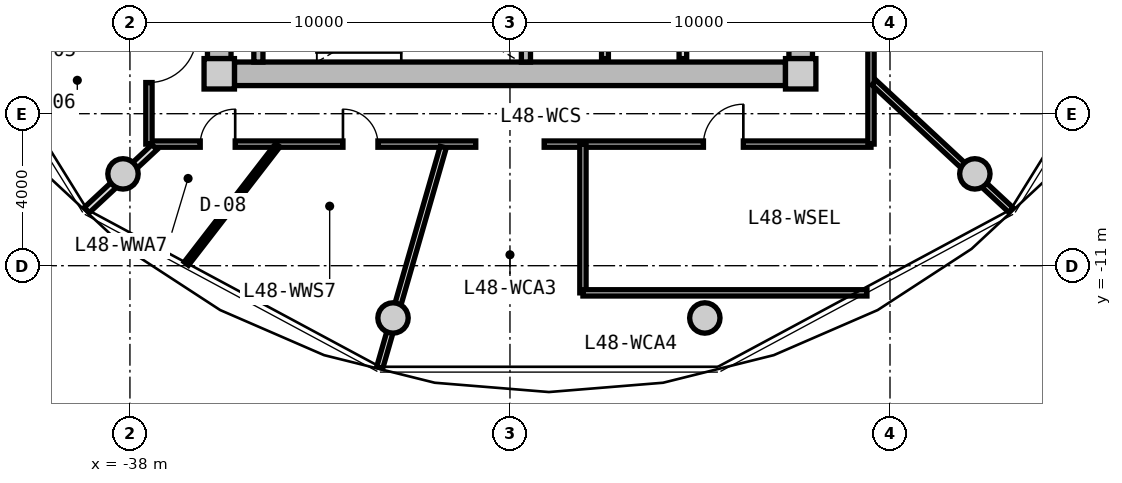
"""IFC4 building model, lengths in metres.
Left out: names, types, materials, properties, quantities, classifications, styles, units other than length and angle.
Written with IfcOpenShell. Run it as: python <this file> out.ifc"""

import sys

from ifc_helpers import new_model, si_unit, direction, frame, frame_2d, origin, origin_2d, place, context, subcontext, project, spatial, rectangle, circle, extrude, source, transform, mapped, element, fill, save


model = new_model("IFC4")
c1 = context("Model", 3, precision=1e-05, world=origin(), true_north=direction((0.0, 1.0)))
c2 = subcontext(c1, "Body", "Model", "MODEL_VIEW")
j1 = project(units=[si_unit("LENGTHUNIT", "METRE"), si_unit("PLANEANGLEUNIT", "RADIAN")], contexts=[c1])
p1 = place(None, origin())
s1 = spatial("IfcSite", under=j1, at=p1, CompositionType="ELEMENT")
p2 = place(p1, origin())
s2 = spatial("IfcBuilding", under=s1, at=p2, CompositionType="ELEMENT")
p3 = place(p2, frame((0.0, 0.0, 155.65)))
s3 = spatial("IfcBuildingStorey", under=s2, at=p3, CompositionType="ELEMENT", Elevation=155.65)
m1 = source(origin(), c2, "Body", "SweptSolid", [
    extrude(rectangle(XDim=0.8, YDim=0.8, at=origin_2d()), origin(), (0.0, 0.0, 1.0), 3.05),
])
for number, where, z_axis, x_axis in (
    (1, (-35.65, -5.95, 0.0), (0.0, 0.0, 1.0), (1.0, 0.0, 0.0)),
    (2, (-20.35, -5.95, 0.0), (0.0, 0.0, 1.0), (1.0, 0.0, 0.0)),
):
    element("IfcColumn", number, at=place(p3, frame(where, z_axis=z_axis, x_axis=x_axis)), inside=s3, PredefinedType="COLUMN", context=c2, shape_type="MappedRepresentation", body=[
        mapped(m1, transform((0.0, 0.0, 0.0), x_axis=(1.0, 0.0, 0.0), y_axis=(0.0, 1.0, 0.0), z_axis=(0.0, 0.0, 1.0), scale=1.0)),
    ])
m2 = source(origin(), c2, "Body", "SweptSolid", [
    extrude(rectangle(XDim=14.5, YDim=0.62, at=frame_2d((7.25, 0.0))), origin(), (0.0, 0.0, 1.0), 2.81),
])
p4 = place(p3, frame((-20.75, -5.95, 0.0), z_axis=(0.0, 0.0, 1.0), x_axis=(-1.0, 0.0, 0.0)))
e3 = element("IfcWall", 3, at=p4, inside=s3, PredefinedType="SHEAR", context=c2, shape_type="MappedRepresentation", body=[
    mapped(m2, transform((0.0, 0.0, 0.0), x_axis=(1.0, 0.0, 0.0), y_axis=(0.0, 1.0, 0.0), z_axis=(0.0, 0.0, 1.0), scale=1.0)),
])
m3 = source(origin(), c2, "Body", "SweptSolid", [
    extrude(rectangle(XDim=11.1, YDim=0.62, at=frame_2d((5.55, 0.0))), origin(), (0.0, 0.0, 1.0), 2.81),
])
p5 = place(p3, frame((-35.65, -5.55, 0.0), z_axis=(0.0, 0.0, 1.0), x_axis=(0.0, 1.0, 0.0)))
e4 = element("IfcWall", 4, at=p5, inside=s3, PredefinedType="SHEAR", context=c2, shape_type="MappedRepresentation", body=[
    mapped(m3, transform((0.0, 0.0, 0.0), x_axis=(1.0, 0.0, 0.0), y_axis=(0.0, 1.0, 0.0), z_axis=(0.0, 0.0, 1.0), scale=1.0)),
])
p6 = place(p5, frame((3.8, 0.0, 0.0)))
e5 = element("IfcOpeningElement", 5, at=p6, cuts=e4, PredefinedType="OPENING", context=c2, shape_type="SweptSolid", body=[
    extrude(rectangle(XDim=1.2, YDim=2.15, at=frame_2d((0.6, 1.075))), frame((0.0, 0.32, 0.0), z_axis=(0.0, -1.0, 0.0), x_axis=(1.0, 0.0, 0.0)), (0.0, 0.0, 1.0), 0.64),
])
p7 = place(p3, frame((-20.35, 5.55, 0.0), z_axis=(0.0, 0.0, 1.0), x_axis=(0.0, -1.0, 0.0)))
e6 = element("IfcWall", 6, at=p7, inside=s3, PredefinedType="SHEAR", context=c2, shape_type="MappedRepresentation", body=[
    mapped(m3, transform((0.0, 0.0, 0.0), x_axis=(1.0, 0.0, 0.0), y_axis=(0.0, 1.0, 0.0), z_axis=(0.0, 0.0, 1.0), scale=1.0)),
])
p8 = place(p7, frame((5.65, 0.0, 0.0)))
e7 = element("IfcOpeningElement", 7, at=p8, cuts=e6, PredefinedType="OPENING", context=c2, shape_type="SweptSolid", body=[
    extrude(rectangle(XDim=1.2, YDim=2.15, at=frame_2d((0.6, 1.075))), frame((0.0, 0.32, 0.0), z_axis=(0.0, -1.0, 0.0), x_axis=(1.0, 0.0, 0.0)), (0.0, 0.0, 1.0), 0.64),
])
m4 = source(origin(), c2, "Body", "SweptSolid", [
    extrude(circle(Radius=0.4, at=origin_2d()), origin(), (0.0, 0.0, 1.0), 3.05),
])
for number, where, z_axis, x_axis in (
    (8, (-38.183, -8.584, 0.0), (0.0, 0.0, 1.0), (1.0, 0.0, 0.0)),
    (9, (-31.077, -12.375, 0.0), (0.0, 0.0, 1.0), (1.0, 0.0, 0.0)),
    (10, (-22.873, -12.375, 0.0), (0.0, 0.0, 1.0), (1.0, 0.0, 0.0)),
    (11, (-15.767, -8.584, 0.0), (0.0, 0.0, 1.0), (1.0, 0.0, 0.0)),
):
    element("IfcColumn", number, at=place(p3, frame(where, z_axis=z_axis, x_axis=x_axis)), inside=s3, PredefinedType="COLUMN", context=c2, shape_type="MappedRepresentation", body=[
        mapped(m4, transform((0.0, 0.0, 0.0), x_axis=(1.0, 0.0, 0.0), y_axis=(0.0, 1.0, 0.0), z_axis=(0.0, 0.0, 1.0), scale=1.0)),
    ])
m5 = source(origin(), c2, "Body", "SweptSolid", [
    extrude(rectangle(XDim=3.19, YDim=0.24, at=frame_2d((1.595, 0.0))), origin(), (0.0, 0.0, 1.0), 2.81),
])
for number, where, z_axis, x_axis in (
    (12, (-34.62, -5.64, 0.0), (0.0, 0.0, 1.0), (0.0, 1.0, 0.0)),
    (13, (-27.58, -5.64, 0.0), (0.0, 0.0, 1.0), (0.0, 1.0, 0.0)),
):
    element("IfcWall", number, at=place(p3, frame(where, z_axis=z_axis, x_axis=x_axis)), inside=s3, PredefinedType="PARTITIONING", context=c2, shape_type="MappedRepresentation", body=[
        mapped(m5, transform((0.0, 0.0, 0.0), x_axis=(1.0, 0.0, 0.0), y_axis=(0.0, 1.0, 0.0), z_axis=(0.0, 0.0, 1.0), scale=1.0)),
    ])
m6 = source(origin(), c2, "Body", "SweptSolid", [
    extrude(rectangle(XDim=3.8, YDim=0.2, at=frame_2d((1.9, 0.0))), origin(), (0.0, 0.0, 1.0), 2.795),
])
p9 = place(p3, frame((-23.45, -5.55, 0.0), z_axis=(0.0, 0.0, 1.0), x_axis=(0.0, 1.0, 0.0)))
e14 = element("IfcWall", 14, at=p9, inside=s3, PredefinedType="PARTITIONING", context=c2, shape_type="MappedRepresentation", body=[
    mapped(m6, transform((0.0, 0.0, 0.0), x_axis=(1.0, 0.0, 0.0), y_axis=(0.0, 1.0, 0.0), z_axis=(0.0, 0.0, 1.0), scale=1.0)),
])
m7 = source(origin(), c2, "Body", "SweptSolid", [
    extrude(rectangle(XDim=3.22, YDim=0.18, at=frame_2d((1.61, 0.0))), origin(), (0.0, 0.0, 1.0), 2.795),
])
p10 = place(p3, frame((-25.5, -5.55, 0.0), z_axis=(0.0, 0.0, 1.0), x_axis=(0.0, 1.0, 0.0)))
e15 = element("IfcWall", 15, at=p10, inside=s3, PredefinedType="PARTITIONING", context=c2, shape_type="MappedRepresentation", body=[
    mapped(m7, transform((0.0, 0.0, 0.0), x_axis=(1.0, 0.0, 0.0), y_axis=(0.0, 1.0, 0.0), z_axis=(0.0, 0.0, 1.0), scale=1.0)),
])
m8 = source(origin(), c2, "Body", "SweptSolid", [
    extrude(rectangle(XDim=8.6, YDim=0.165, at=frame_2d((4.3, 0.0))), origin(), (0.0, 0.0, 1.0), 2.795),
])
p11 = place(p3, frame((-18.5, -7.8, 0.0), z_axis=(0.0, 0.0, 1.0), x_axis=(-1.0, 0.0, 0.0)))
e16 = element("IfcWall", 16, at=p11, inside=s3, PredefinedType="PARTITIONING", context=c2, shape_type="MappedRepresentation", body=[
    mapped(m8, transform((0.0, 0.0, 0.0), x_axis=(1.0, 0.0, 0.0), y_axis=(0.0, 1.0, 0.0), z_axis=(0.0, 0.0, 1.0), scale=1.0)),
])
p12 = place(p11, frame((3.359, 0.0, 0.0)))
e17 = element("IfcOpeningElement", 17, at=p12, cuts=e16, PredefinedType="OPENING", context=c2, shape_type="SweptSolid", body=[
    extrude(rectangle(XDim=1.05, YDim=2.15, at=frame_2d((0.525, 1.075))), frame((0.0, 0.093, 0.0), z_axis=(0.0, -1.0, 0.0), x_axis=(1.0, 0.0, 0.0)), (0.0, 0.0, 1.0), 0.185),
])
p13 = place(p3, frame((-28.9, -7.8, 0.0), z_axis=(0.0, 0.0, 1.0), x_axis=(-1.0, 0.0, 0.0)))
e18 = element("IfcWall", 18, at=p13, inside=s3, PredefinedType="PARTITIONING", context=c2, shape_type="MappedRepresentation", body=[
    mapped(m8, transform((0.0, 0.0, 0.0), x_axis=(1.0, 0.0, 0.0), y_axis=(0.0, 1.0, 0.0), z_axis=(0.0, 0.0, 1.0), scale=1.0)),
])
p14 = place(p13, frame((6.33, 0.0, 0.0)))
e19 = element("IfcOpeningElement", 19, at=p14, cuts=e18, PredefinedType="OPENING", context=c2, shape_type="SweptSolid", body=[
    extrude(rectangle(XDim=0.92, YDim=2.1, at=frame_2d((0.46, 1.05))), frame((0.0, 0.093, 0.0), z_axis=(0.0, -1.0, 0.0), x_axis=(1.0, 0.0, 0.0)), (0.0, 0.0, 1.0), 0.185),
])
p15 = place(p13, frame((2.575, 0.0, 0.0)))
e20 = element("IfcOpeningElement", 20, at=p15, cuts=e18, PredefinedType="OPENING", context=c2, shape_type="SweptSolid", body=[
    extrude(rectangle(XDim=0.92, YDim=2.1, at=frame_2d((0.46, 1.05))), frame((0.0, 0.093, 0.0), z_axis=(0.0, -1.0, 0.0), x_axis=(1.0, 0.0, 0.0)), (0.0, 0.0, 1.0), 0.185),
])
m9 = source(origin(), c2, "Body", "SweptSolid", [
    extrude(rectangle(XDim=15.6, YDim=0.165, at=frame_2d((7.8, 0.0))), origin(), (0.0, 0.0, 1.0), 2.795),
])
p16 = place(p3, frame((-37.5, -7.8, 0.0), z_axis=(0.0, 0.0, 1.0), x_axis=(0.0, 1.0, 0.0)))
e21 = element("IfcWall", 21, at=p16, inside=s3, PredefinedType="PARTITIONING", context=c2, shape_type="MappedRepresentation", body=[
    mapped(m9, transform((0.0, 0.0, 0.0), x_axis=(1.0, 0.0, 0.0), y_axis=(0.0, 1.0, 0.0), z_axis=(0.0, 0.0, 1.0), scale=1.0)),
])
p17 = place(p16, frame((13.16, 0.0, 0.0)))
e22 = element("IfcOpeningElement", 22, at=p17, cuts=e21, PredefinedType="OPENING", context=c2, shape_type="SweptSolid", body=[
    extrude(rectangle(XDim=1.25, YDim=2.2, at=frame_2d((0.625, 1.1))), frame((0.0, 0.093, 0.0), z_axis=(0.0, -1.0, 0.0), x_axis=(1.0, 0.0, 0.0)), (0.0, 0.0, 1.0), 0.185),
])
p18 = place(p16, frame((7.757, 0.0, 0.0)))
e23 = element("IfcOpeningElement", 23, at=p18, cuts=e21, PredefinedType="OPENING", context=c2, shape_type="SweptSolid", body=[
    extrude(rectangle(XDim=1.25, YDim=2.2, at=frame_2d((0.625, 1.1))), frame((0.0, 0.093, 0.0), z_axis=(0.0, -1.0, 0.0), x_axis=(1.0, 0.0, 0.0)), (0.0, 0.0, 1.0), 0.185),
])
p19 = place(p16, frame((1.62, 0.0, 0.0)))
e24 = element("IfcOpeningElement", 24, at=p19, cuts=e21, PredefinedType="OPENING", context=c2, shape_type="SweptSolid", body=[
    extrude(rectangle(XDim=1.25, YDim=2.2, at=frame_2d((0.625, 1.1))), frame((0.0, 0.093, 0.0), z_axis=(0.0, -1.0, 0.0), x_axis=(1.0, 0.0, 0.0)), (0.0, 0.0, 1.0), 0.185),
])
p20 = place(p3, frame((-18.5, 7.8, 0.0), z_axis=(0.0, 0.0, 1.0), x_axis=(0.0, -1.0, 0.0)))
e25 = element("IfcWall", 25, at=p20, inside=s3, PredefinedType="PARTITIONING", context=c2, shape_type="MappedRepresentation", body=[
    mapped(m9, transform((0.0, 0.0, 0.0), x_axis=(1.0, 0.0, 0.0), y_axis=(0.0, 1.0, 0.0), z_axis=(0.0, 0.0, 1.0), scale=1.0)),
])
p21 = place(p20, frame((8.314, 0.0, 0.0)))
e26 = element("IfcOpeningElement", 26, at=p21, cuts=e25, PredefinedType="OPENING", context=c2, shape_type="SweptSolid", body=[
    extrude(rectangle(XDim=1.25, YDim=2.2, at=frame_2d((0.625, 1.1))), frame((0.0, 0.093, 0.0), z_axis=(0.0, -1.0, 0.0), x_axis=(1.0, 0.0, 0.0)), (0.0, 0.0, 1.0), 0.185),
])
p22 = place(p20, frame((1.515, 0.0, 0.0)))
e27 = element("IfcOpeningElement", 27, at=p22, cuts=e25, PredefinedType="OPENING", context=c2, shape_type="SweptSolid", body=[
    extrude(rectangle(XDim=1.05, YDim=2.15, at=frame_2d((0.525, 1.075))), frame((0.0, 0.093, 0.0), z_axis=(0.0, -1.0, 0.0), x_axis=(1.0, 0.0, 0.0)), (0.0, 0.0, 1.0), 0.185),
])
m10 = source(origin(), c2, "Body", "SweptSolid", [
    extrude(rectangle(XDim=6.035, YDim=0.165, at=frame_2d((3.018, 0.0))), origin(), (0.0, 0.0, 1.0), 2.345),
])
p23 = place(p3, frame((-29.756, -7.88, 0.0), z_axis=(0.0, 0.0, 1.0), x_axis=(-0.276809454862, -0.960924828329, 0.0)))
e28 = element("IfcWall", 28, at=p23, inside=s3, PredefinedType="PARTITIONING", context=c2, shape_type="MappedRepresentation", body=[
    mapped(m10, transform((0.0, 0.0, 0.0), x_axis=(1.0, 0.0, 0.0), y_axis=(0.0, 1.0, 0.0), z_axis=(0.0, 0.0, 1.0), scale=1.0)),
])
m11 = source(origin(), c2, "Body", "SweptSolid", [
    extrude(rectangle(XDim=4.927, YDim=0.165, at=frame_2d((2.463, 0.0))), origin(), (0.0, 0.0, 1.0), 2.345),
])
p24 = place(p3, frame((-18.42, -6.183, 0.0), z_axis=(0.0, 0.0, 1.0), x_axis=(0.732191335987, -0.681098999783, 0.0)))
e29 = element("IfcWall", 29, at=p24, inside=s3, PredefinedType="PARTITIONING", context=c2, shape_type="MappedRepresentation", body=[
    mapped(m11, transform((0.0, 0.0, 0.0), x_axis=(1.0, 0.0, 0.0), y_axis=(0.0, 1.0, 0.0), z_axis=(0.0, 0.0, 1.0), scale=1.0)),
])
m12 = source(origin(), c2, "Body", "SweptSolid", [
    extrude(rectangle(XDim=3.915, YDim=0.165, at=frame_2d((1.957, 0.0))), origin(), (0.0, 0.0, 1.0), 2.795),
])
p25 = place(p3, frame((-26.08, -11.715, 0.0), z_axis=(0.0, 0.0, 1.0), x_axis=(0.0, 1.0, 0.0)))
e30 = element("IfcWall", 30, at=p25, inside=s3, PredefinedType="PARTITIONING", context=c2, shape_type="MappedRepresentation", body=[
    mapped(m12, transform((0.0, 0.0, 0.0), x_axis=(1.0, 0.0, 0.0), y_axis=(0.0, 1.0, 0.0), z_axis=(0.0, 0.0, 1.0), scale=1.0)),
])
m13 = source(origin(), c2, "Body", "SweptSolid", [
    extrude(rectangle(XDim=7.473, YDim=0.165, at=frame_2d((3.737, 0.0))), origin(), (0.0, 0.0, 1.0), 2.795),
])
p26 = place(p3, frame((-26.08, -11.715, 0.0), z_axis=(0.0, 0.0, 1.0), x_axis=(1.0, 0.0, 0.0)))
e31 = element("IfcWall", 31, at=p26, inside=s3, PredefinedType="PARTITIONING", context=c2, shape_type="MappedRepresentation", body=[
    mapped(m13, transform((0.0, 0.0, 0.0), x_axis=(1.0, 0.0, 0.0), y_axis=(0.0, 1.0, 0.0), z_axis=(0.0, 0.0, 1.0), scale=1.0)),
])
m14 = source(origin(), c2, "Body", "SweptSolid", [
    extrude(rectangle(XDim=2.435, YDim=0.19, at=frame_2d((1.217, 0.0))), origin(), (0.0, 0.0, 1.0), 2.345),
])
p27 = place(p3, frame((-37.354, -7.88, 0.0), z_axis=(0.0, 0.0, 1.0), x_axis=(-0.732164643118, -0.681127693878, 0.0)))
e32 = element("IfcWall", 32, at=p27, inside=s3, PredefinedType="PARTITIONING", context=c2, shape_type="MappedRepresentation", body=[
    mapped(m14, transform((0.0, 0.0, 0.0), x_axis=(1.0, 0.0, 0.0), y_axis=(0.0, 1.0, 0.0), z_axis=(0.0, 0.0, 1.0), scale=1.0)),
])
m15 = source(origin(), c2, "Body", "SweptSolid", [
    extrude(rectangle(XDim=3.937, YDim=0.14, at=frame_2d((1.968, 0.0))), origin(), (0.0, 0.0, 1.0), 2.795),
])
p28 = place(p3, frame((-34.11, -7.83, 0.0), z_axis=(0.0, 0.0, 1.0), x_axis=(-0.611016723561, -0.791617687731, 0.0)))
e33 = element("IfcWall", 33, at=p28, inside=s3, PredefinedType="PARTITIONING", context=c2, shape_type="MappedRepresentation", body=[
    mapped(m15, transform((0.0, 0.0, 0.0), x_axis=(1.0, 0.0, 0.0), y_axis=(0.0, 1.0, 0.0), z_axis=(0.0, 0.0, 1.0), scale=1.0)),
])
m16 = source(origin(), c2, "Body", "SweptSolid", [
    extrude(rectangle(XDim=1.05, YDim=2.15, at=frame_2d((0.525, 1.075))), frame((0.0, 0.025, 0.0), z_axis=(0.0, -1.0, 0.0), x_axis=(1.0, 0.0, 0.0)), (0.0, 0.0, 1.0), 0.05),
])
p29 = place(p12, frame((1.05, 0.0, 0.0), z_axis=(0.0, 0.0, 1.0), x_axis=(-1.0, 0.0, 0.0)))
e34 = element("IfcDoor", 34, at=p29, inside=s3, OperationType="SINGLE_SWING_RIGHT", PredefinedType="DOOR", context=c2, shape_type="MappedRepresentation", body=[
    mapped(m16, transform((0.0, 0.0, 0.0), x_axis=(1.0, 0.0, 0.0), y_axis=(0.0, 1.0, 0.0), z_axis=(0.0, 0.0, 1.0), scale=1.0)),
])
fill(e17, e34)
m17 = source(origin(), c2, "Body", "SweptSolid", [
    extrude(rectangle(XDim=1.25, YDim=2.2, at=frame_2d((0.625, 1.1))), frame((0.0, 0.025, 0.0), z_axis=(0.0, -1.0, 0.0), x_axis=(1.0, 0.0, 0.0)), (0.0, 0.0, 1.0), 0.05),
])
p30 = place(p19, frame((1.25, 0.0, 0.0), z_axis=(0.0, 0.0, 1.0), x_axis=(-1.0, 0.0, 0.0)))
e35 = element("IfcDoor", 35, at=p30, inside=s3, OperationType="SINGLE_SWING_LEFT", PredefinedType="DOOR", context=c2, shape_type="MappedRepresentation", body=[
    mapped(m17, transform((0.0, 0.0, 0.0), x_axis=(1.0, 0.0, 0.0), y_axis=(0.0, 1.0, 0.0), z_axis=(0.0, 0.0, 1.0), scale=1.0)),
])
fill(e24, e35)
m18 = source(origin(), c2, "Body", "SweptSolid", [
    extrude(rectangle(XDim=0.92, YDim=2.1, at=frame_2d((0.46, 1.05))), frame((0.0, 0.025, 0.0), z_axis=(0.0, -1.0, 0.0), x_axis=(1.0, 0.0, 0.0)), (0.0, 0.0, 1.0), 0.05),
])
p31 = place(p14, frame((0.92, 0.0, 0.0), z_axis=(0.0, 0.0, 1.0), x_axis=(-1.0, 0.0, 0.0)))
e36 = element("IfcDoor", 36, at=p31, inside=s3, OperationType="SINGLE_SWING_RIGHT", PredefinedType="DOOR", context=c2, shape_type="MappedRepresentation", body=[
    mapped(m18, transform((0.0, 0.0, 0.0), x_axis=(1.0, 0.0, 0.0), y_axis=(0.0, 1.0, 0.0), z_axis=(0.0, 0.0, 1.0), scale=1.0)),
])
fill(e19, e36)
p32 = place(p15, frame((0.92, 0.0, 0.0), z_axis=(0.0, 0.0, 1.0), x_axis=(-1.0, 0.0, 0.0)))
e37 = element("IfcDoor", 37, at=p32, inside=s3, OperationType="SINGLE_SWING_LEFT", PredefinedType="DOOR", context=c2, shape_type="MappedRepresentation", body=[
    mapped(m18, transform((0.0, 0.0, 0.0), x_axis=(1.0, 0.0, 0.0), y_axis=(0.0, 1.0, 0.0), z_axis=(0.0, 0.0, 1.0), scale=1.0)),
])
fill(e20, e37)
save(model, sys.argv[1])
